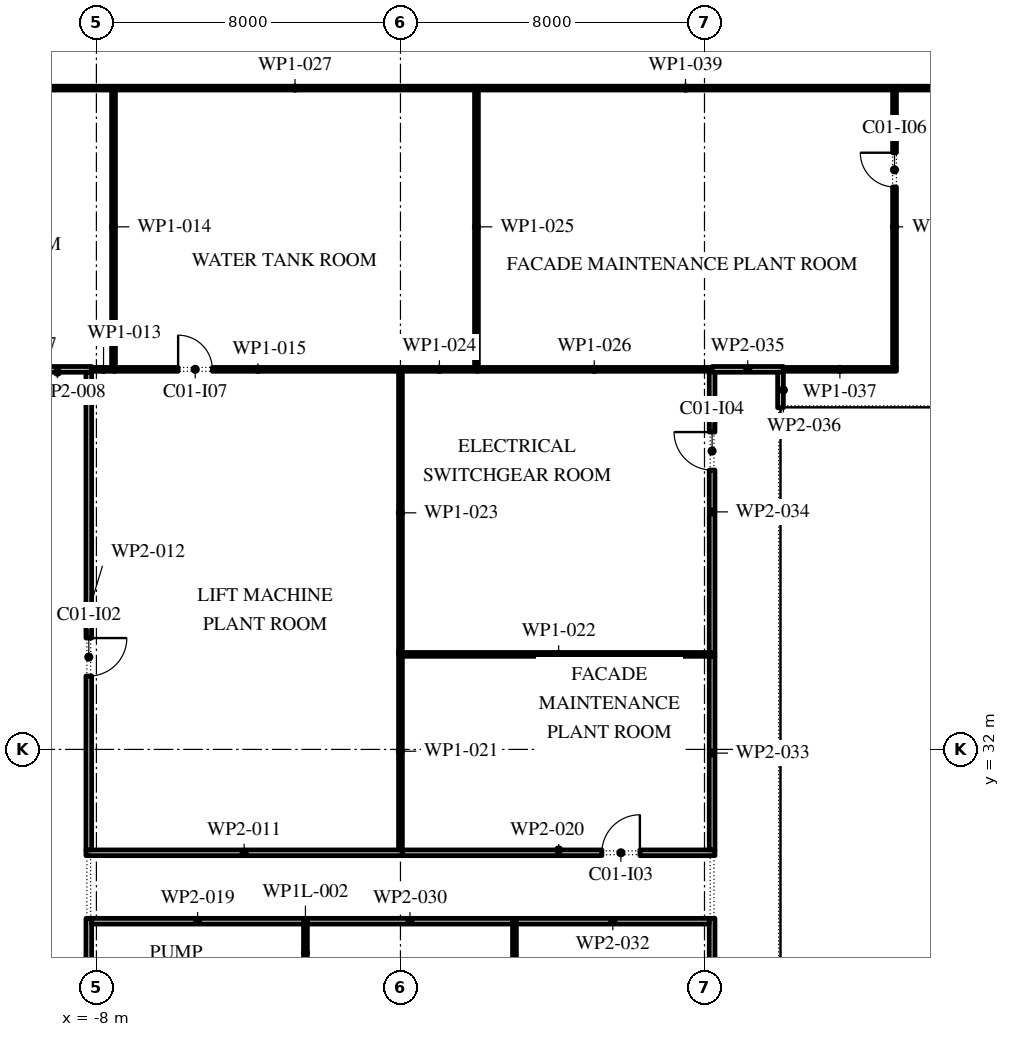
"""IFC4 building model, lengths in metres.
Left out: names, types, materials, properties, quantities, classifications, styles, units other than length and angle.
Written with IfcOpenShell. Run it as: python <this file> out.ifc"""

import sys

from ifc_helpers import new_model, si_unit, direction, frame, frame_2d, origin, place, context, subcontext, project, spatial, rectangle, extrude, element, fill, save


model = new_model("IFC4")
c1 = context("Model", 3, precision=1e-05, world=origin(), true_north=direction((0.0, 1.0)))
c2 = subcontext(c1, "Body", "Model", "MODEL_VIEW")
j1 = project(units=[si_unit("LENGTHUNIT", "METRE"), si_unit("PLANEANGLEUNIT", "RADIAN")], contexts=[c1])
p1 = place(None, origin())
s1 = spatial("IfcSite", under=j1, at=p1, CompositionType="ELEMENT")
p2 = place(p1, origin())
s2 = spatial("IfcBuilding", under=s1, at=p2, CompositionType="ELEMENT")
p3 = place(p2, frame((0.0, 0.0, 369.0)))
s3 = spatial("IfcBuildingStorey", under=s2, at=p3, CompositionType="ELEMENT", Elevation=369.0)
p4 = place(p3, frame((-9.925, 42.0, 0.0), z_axis=(0.0, 0.0, 1.0), x_axis=(1.0, 0.0, 0.0)))
e1 = element("IfcWall", 1, at=p4, inside=s3, PredefinedType="PARTITIONING", context=c2, shape_type="SweptSolid", body=[
    extrude(rectangle(XDim=1.8, YDim=0.15, at=frame_2d((0.9, 0.0))), origin(), (0.0, 0.0, 1.0), 4.0),
])
p5 = place(p3, frame((-8.2, 27.555, 0.0), z_axis=(0.0, 0.0, 1.0), x_axis=(0.0, -1.0, 0.0)))
e2 = element("IfcWall", 2, at=p5, inside=s3, PredefinedType="PARTITIONING", context=c2, shape_type="SweptSolid", body=[
    extrude(rectangle(XDim=8.48, YDim=0.15, at=frame_2d((4.24, 0.0))), origin(), (0.0, 0.0, 1.0), 4.0),
])
p6 = place(p5, frame((4.655, 0.0, 0.0)))
e3 = element("IfcOpeningElement", 3, at=p6, cuts=e2, PredefinedType="OPENING", context=c2, shape_type="SweptSolid", body=[
    extrude(rectangle(XDim=1.0, YDim=2.1, at=frame_2d((0.5, 1.05))), frame((0.0, 0.085, 0.0), z_axis=(0.0, -1.0, 0.0), x_axis=(1.0, 0.0, 0.0)), (0.0, 0.0, 1.0), 0.17),
])
p7 = place(p3, frame((-8.275, 29.28, 0.0), z_axis=(0.0, 0.0, 1.0), x_axis=(1.0, 0.0, 0.0)))
e4 = element("IfcWall", 4, at=p7, inside=s3, PredefinedType="PARTITIONING", context=c2, shape_type="SweptSolid", body=[
    extrude(rectangle(XDim=8.325, YDim=0.15, at=frame_2d((4.163, 0.0))), origin(), (0.0, 0.0, 1.0), 4.0),
])
p8 = place(p3, frame((-8.2, 41.925, 0.0), z_axis=(0.0, 0.0, 1.0), x_axis=(0.0, -1.0, 0.0)))
e5 = element("IfcWall", 5, at=p8, inside=s3, PredefinedType="PARTITIONING", context=c2, shape_type="SweptSolid", body=[
    extrude(rectangle(XDim=12.57, YDim=0.15, at=frame_2d((6.285, 0.0))), origin(), (0.0, 0.0, 1.0), 4.0),
])
p9 = place(p8, frame((6.995, 0.0, 0.0)))
e6 = element("IfcOpeningElement", 6, at=p9, cuts=e5, PredefinedType="OPENING", context=c2, shape_type="SweptSolid", body=[
    extrude(rectangle(XDim=1.0, YDim=2.1, at=frame_2d((0.5, 1.05))), frame((0.0, 0.085, 0.0), z_axis=(0.0, -1.0, 0.0), x_axis=(1.0, 0.0, 0.0)), (0.0, 0.0, 1.0), 0.17),
])
p10 = place(p3, frame((-8.125, 42.0, 0.0), z_axis=(0.0, 0.0, 1.0), x_axis=(1.0, 0.0, 0.0)))
e7 = element("IfcWall", 7, at=p10, inside=s3, PredefinedType="PARTITIONING", context=c2, shape_type="SweptSolid", body=[
    extrude(rectangle(XDim=0.625, YDim=0.1, at=frame_2d((0.312, 0.0))), origin(), (0.0, 0.0, 1.0), 4.0),
])
p11 = place(p3, frame((-7.55, 42.05, 0.0), z_axis=(0.0, 0.0, 1.0), x_axis=(0.0, 1.0, 0.0)))
e8 = element("IfcWall", 8, at=p11, inside=s3, PredefinedType="PARTITIONING", context=c2, shape_type="SweptSolid", body=[
    extrude(rectangle(XDim=7.4, YDim=0.1, at=frame_2d((3.7, 0.0))), origin(), (0.0, 0.0, 1.0), 4.0),
])
p12 = place(p3, frame((-7.55, 42.0, 0.0), z_axis=(0.0, 0.0, 1.0), x_axis=(1.0, 0.0, 0.0)))
e9 = element("IfcWall", 9, at=p12, inside=s3, PredefinedType="PARTITIONING", context=c2, shape_type="SweptSolid", body=[
    extrude(rectangle(XDim=7.6, YDim=0.1, at=frame_2d((3.8, 0.0))), origin(), (0.0, 0.0, 1.0), 4.0),
])
p13 = place(p12, frame((1.7, 0.0, 0.0)))
e10 = element("IfcOpeningElement", 10, at=p13, cuts=e9, PredefinedType="OPENING", context=c2, shape_type="SweptSolid", body=[
    extrude(rectangle(XDim=0.9, YDim=2.1, at=frame_2d((0.45, 1.05))), frame((0.0, 0.06, 0.0), z_axis=(0.0, -1.0, 0.0), x_axis=(1.0, 0.0, 0.0)), (0.0, 0.0, 1.0), 0.12),
])
p14 = place(p3, frame((-7.6, 49.4, 0.0), z_axis=(0.0, 0.0, 1.0), x_axis=(-1.0, 0.0, 0.0)))
e11 = element("IfcWall", 11, at=p14, inside=s3, PredefinedType="PARTITIONING", context=c2, shape_type="SweptSolid", body=[
    extrude(rectangle(XDim=10.35, YDim=0.1, at=frame_2d((5.175, 0.0))), origin(), (0.0, 0.0, 1.0), 4.0),
])
p15 = place(p3, frame((-2.55, 27.48, 0.0), z_axis=(0.0, 0.0, 1.0), x_axis=(-1.0, 0.0, 0.0)))
e12 = element("IfcWall", 12, at=p15, inside=s3, PredefinedType="PARTITIONING", context=c2, shape_type="SweptSolid", body=[
    extrude(rectangle(XDim=5.575, YDim=0.15, at=frame_2d((2.788, 0.0))), origin(), (0.0, 0.0, 1.0), 4.0),
])
p16 = place(p3, frame((0.05, 29.28, 0.0), z_axis=(0.0, 0.0, 1.0), x_axis=(1.0, 0.0, 0.0)))
e13 = element("IfcWall", 13, at=p16, inside=s3, PredefinedType="PARTITIONING", context=c2, shape_type="SweptSolid", body=[
    extrude(rectangle(XDim=8.225, YDim=0.15, at=frame_2d((4.112, 0.0))), origin(), (0.0, 0.0, 1.0), 4.0),
])
p17 = place(p16, frame((5.25, 0.0, 0.0)))
e14 = element("IfcOpeningElement", 14, at=p17, cuts=e13, PredefinedType="OPENING", context=c2, shape_type="SweptSolid", body=[
    extrude(rectangle(XDim=1.0, YDim=2.1, at=frame_2d((0.5, 1.05))), frame((0.0, 0.085, 0.0), z_axis=(0.0, -1.0, 0.0), x_axis=(1.0, 0.0, 0.0)), (0.0, 0.0, 1.0), 0.17),
])
p18 = place(p3, frame((0.0, 34.55, 0.0), z_axis=(0.0, 0.0, 1.0), x_axis=(0.0, -1.0, 0.0)))
e15 = element("IfcWall", 15, at=p18, inside=s3, PredefinedType="PARTITIONING", context=c2, shape_type="SweptSolid", body=[
    extrude(rectangle(XDim=5.195, YDim=0.1, at=frame_2d((2.598, 0.0))), origin(), (0.0, 0.0, 1.0), 4.0),
])
p19 = place(p3, frame((0.05, 34.5, 0.0), z_axis=(0.0, 0.0, 1.0), x_axis=(1.0, 0.0, 0.0)))
e16 = element("IfcWall", 16, at=p19, inside=s3, PredefinedType="PARTITIONING", context=c2, shape_type="SweptSolid", body=[
    extrude(rectangle(XDim=8.225, YDim=0.1, at=frame_2d((4.112, 0.0))), origin(), (0.0, 0.0, 1.0), 4.0),
])
p20 = place(p3, frame((0.0, 41.95, 0.0), z_axis=(0.0, 0.0, 1.0), x_axis=(0.0, -1.0, 0.0)))
e17 = element("IfcWall", 17, at=p20, inside=s3, PredefinedType="PARTITIONING", context=c2, shape_type="SweptSolid", body=[
    extrude(rectangle(XDim=7.45, YDim=0.1, at=frame_2d((3.725, 0.0))), origin(), (0.0, 0.0, 1.0), 4.0),
])
p21 = place(p3, frame((0.0, 42.0, 0.0), z_axis=(0.0, 0.0, 1.0), x_axis=(1.0, 0.0, 0.0)))
e18 = element("IfcWall", 18, at=p21, inside=s3, PredefinedType="PARTITIONING", context=c2, shape_type="SweptSolid", body=[
    extrude(rectangle(XDim=2.05, YDim=0.1, at=frame_2d((1.025, 0.0))), origin(), (0.0, 0.0, 1.0), 4.0),
])
p22 = place(p3, frame((2.0, 42.05, 0.0), z_axis=(0.0, 0.0, 1.0), x_axis=(0.0, 1.0, 0.0)))
e19 = element("IfcWall", 19, at=p22, inside=s3, PredefinedType="PARTITIONING", context=c2, shape_type="SweptSolid", body=[
    extrude(rectangle(XDim=7.4, YDim=0.1, at=frame_2d((3.7, 0.0))), origin(), (0.0, 0.0, 1.0), 4.0),
])
p23 = place(p3, frame((2.0, 42.0, 0.0), z_axis=(0.0, 0.0, 1.0), x_axis=(1.0, 0.0, 0.0)))
e20 = element("IfcWall", 20, at=p23, inside=s3, PredefinedType="PARTITIONING", context=c2, shape_type="SweptSolid", body=[
    extrude(rectangle(XDim=6.2, YDim=0.1, at=frame_2d((3.1, 0.0))), origin(), (0.0, 0.0, 1.0), 4.0),
])
p24 = place(p3, frame((1.95, 49.4, 0.0), z_axis=(0.0, 0.0, 1.0), x_axis=(-1.0, 0.0, 0.0)))
e21 = element("IfcWall", 21, at=p24, inside=s3, PredefinedType="PARTITIONING", context=c2, shape_type="SweptSolid", body=[
    extrude(rectangle(XDim=9.45, YDim=0.1, at=frame_2d((4.725, 0.0))), origin(), (0.0, 0.0, 1.0), 4.0),
])
p25 = place(p3, frame((3.0, 19.075, 0.0), z_axis=(0.0, 0.0, 1.0), x_axis=(0.0, 1.0, 0.0)))
e22 = element("IfcWall", 22, at=p25, inside=s3, PredefinedType="PARTITIONING", context=c2, shape_type="SweptSolid", body=[
    extrude(rectangle(XDim=8.48, YDim=0.1, at=frame_2d((4.24, 0.0))), origin(), (0.0, 0.0, 1.0), 4.0),
])
p26 = place(p3, frame((2.95, 27.48, 0.0), z_axis=(0.0, 0.0, 1.0), x_axis=(-1.0, 0.0, 0.0)))
e23 = element("IfcWall", 23, at=p26, inside=s3, PredefinedType="PARTITIONING", context=c2, shape_type="SweptSolid", body=[
    extrude(rectangle(XDim=5.4, YDim=0.15, at=frame_2d((2.7, 0.0))), origin(), (0.0, 0.0, 1.0), 4.0),
])
p27 = place(p3, frame((8.2, 19.075, 0.0), z_axis=(0.0, 0.0, 1.0), x_axis=(0.0, 1.0, 0.0)))
e24 = element("IfcWall", 24, at=p27, inside=s3, PredefinedType="PARTITIONING", context=c2, shape_type="SweptSolid", body=[
    extrude(rectangle(XDim=8.48, YDim=0.15, at=frame_2d((4.24, 0.0))), origin(), (0.0, 0.0, 1.0), 4.0),
])
p28 = place(p27, frame((2.755, 0.0, 0.0)))
e25 = element("IfcOpeningElement", 25, at=p28, cuts=e24, PredefinedType="OPENING", context=c2, shape_type="SweptSolid", body=[
    extrude(rectangle(XDim=1.0, YDim=2.1, at=frame_2d((0.5, 1.05))), frame((0.0, 0.085, 0.0), z_axis=(0.0, -1.0, 0.0), x_axis=(1.0, 0.0, 0.0)), (0.0, 0.0, 1.0), 0.17),
])
p29 = place(p3, frame((8.125, 27.48, 0.0), z_axis=(0.0, 0.0, 1.0), x_axis=(-1.0, 0.0, 0.0)))
e26 = element("IfcWall", 26, at=p29, inside=s3, PredefinedType="PARTITIONING", context=c2, shape_type="SweptSolid", body=[
    extrude(rectangle(XDim=5.075, YDim=0.15, at=frame_2d((2.538, 0.0))), origin(), (0.0, 0.0, 1.0), 4.0),
])
p30 = place(p3, frame((8.2, 29.355, 0.0), z_axis=(0.0, 0.0, 1.0), x_axis=(0.0, 1.0, 0.0)))
e27 = element("IfcWall", 27, at=p30, inside=s3, PredefinedType="PARTITIONING", context=c2, shape_type="SweptSolid", body=[
    extrude(rectangle(XDim=5.095, YDim=0.15, at=frame_2d((2.547, 0.0))), origin(), (0.0, 0.0, 1.0), 4.0),
])
p31 = place(p3, frame((8.2, 34.55, 0.0), z_axis=(0.0, 0.0, 1.0), x_axis=(0.0, 1.0, 0.0)))
e28 = element("IfcWall", 28, at=p31, inside=s3, PredefinedType="PARTITIONING", context=c2, shape_type="SweptSolid", body=[
    extrude(rectangle(XDim=7.4, YDim=0.15, at=frame_2d((3.7, 0.0))), origin(), (0.0, 0.0, 1.0), 4.0),
])
p32 = place(p31, frame((4.8, 0.0, 0.0)))
e29 = element("IfcOpeningElement", 29, at=p32, cuts=e28, PredefinedType="OPENING", context=c2, shape_type="SweptSolid", body=[
    extrude(rectangle(XDim=1.0, YDim=2.1, at=frame_2d((0.5, 1.05))), frame((0.0, 0.085, 0.0), z_axis=(0.0, -1.0, 0.0), x_axis=(1.0, 0.0, 0.0)), (0.0, 0.0, 1.0), 0.17),
])
p33 = place(p3, frame((8.2, 42.0, 0.0), z_axis=(0.0, 0.0, 1.0), x_axis=(1.0, 0.0, 0.0)))
e30 = element("IfcWall", 30, at=p33, inside=s3, PredefinedType="PARTITIONING", context=c2, shape_type="SweptSolid", body=[
    extrude(rectangle(XDim=1.875, YDim=0.15, at=frame_2d((0.938, 0.0))), origin(), (0.0, 0.0, 1.0), 4.0),
])
p34 = place(p3, frame((10.0, 41.925, 0.0), z_axis=(0.0, 0.0, 1.0), x_axis=(0.0, -1.0, 0.0)))
e31 = element("IfcWall", 31, at=p34, inside=s3, PredefinedType="PARTITIONING", context=c2, shape_type="SweptSolid", body=[
    extrude(rectangle(XDim=0.935, YDim=0.15, at=frame_2d((0.468, 0.0))), origin(), (0.0, 0.0, 1.0), 4.0),
])
p35 = place(p3, frame((10.075, 42.0, 0.0), z_axis=(0.0, 0.0, 1.0), x_axis=(1.0, 0.0, 0.0)))
e32 = element("IfcWall", 32, at=p35, inside=s3, PredefinedType="PARTITIONING", context=c2, shape_type="SweptSolid", body=[
    extrude(rectangle(XDim=2.975, YDim=0.1, at=frame_2d((1.488, 0.0))), origin(), (0.0, 0.0, 1.0), 4.0),
])
p36 = place(p3, frame((13.0, 42.05, 0.0), z_axis=(0.0, 0.0, 1.0), x_axis=(0.0, 1.0, 0.0)))
e33 = element("IfcWall", 33, at=p36, inside=s3, PredefinedType="PARTITIONING", context=c2, shape_type="SweptSolid", body=[
    extrude(rectangle(XDim=7.4, YDim=0.1, at=frame_2d((3.7, 0.0))), origin(), (0.0, 0.0, 1.0), 3.02),
])
p37 = place(p36, frame((4.75, 0.0, 0.0)))
e34 = element("IfcOpeningElement", 34, at=p37, cuts=e33, PredefinedType="OPENING", context=c2, shape_type="SweptSolid", body=[
    extrude(rectangle(XDim=0.9, YDim=2.1, at=frame_2d((0.45, 1.05))), frame((0.0, 0.06, 0.0), z_axis=(0.0, -1.0, 0.0), x_axis=(1.0, 0.0, 0.0)), (0.0, 0.0, 1.0), 0.12),
])
p38 = place(p3, frame((12.95, 49.4, 0.0), z_axis=(0.0, 0.0, 1.0), x_axis=(-1.0, 0.0, 0.0)))
e35 = element("IfcWall", 35, at=p38, inside=s3, PredefinedType="PARTITIONING", context=c2, shape_type="SweptSolid", body=[
    extrude(rectangle(XDim=10.9, YDim=0.1, at=frame_2d((5.45, 0.0))), origin(), (0.0, 0.0, 1.0), 4.0),
])
p39 = place(p3, frame((22.66, 49.4, 0.0), z_axis=(0.0, 0.0, 1.0), x_axis=(-1.0, 0.0, 0.0)))
e36 = element("IfcWall", 36, at=p39, inside=s3, PredefinedType="PARTITIONING", context=c2, shape_type="SweptSolid", body=[
    extrude(rectangle(XDim=9.61, YDim=0.1, at=frame_2d((4.805, 0.0))), origin(), (0.0, 0.0, 1.0), 4.0),
])
p40 = place(p39, frame((3.45, 0.0, 0.0)))
e37 = element("IfcOpeningElement", 37, at=p40, cuts=e36, PredefinedType="OPENING", context=c2, shape_type="SweptSolid", body=[
    extrude(rectangle(XDim=0.9, YDim=2.1, at=frame_2d((0.45, 1.05))), frame((0.0, 0.06, 0.0), z_axis=(0.0, -1.0, 0.0), x_axis=(1.0, 0.0, 0.0)), (0.0, 0.0, 1.0), 0.12),
])
p41 = place(p3, frame((-2.5, 25.745, 0.0), z_axis=(0.0, 0.0, 1.0), x_axis=(0.0, 1.0, 0.0)))
e38 = element("IfcWall", 38, at=p41, inside=s3, PredefinedType="PARTITIONING", context=c2, shape_type="SweptSolid", body=[
    extrude(rectangle(XDim=1.81, YDim=0.1, at=frame_2d((0.905, 0.0))), origin(), (0.0, 0.0, 1.0), 3.02),
])
p42 = place(p9, origin())
e39 = element("IfcDoor", 39, at=p42, inside=s3, OperationType="SINGLE_SWING_RIGHT", PredefinedType="DOOR", context=c2, shape_type="SweptSolid", body=[
    extrude(rectangle(XDim=1.0, YDim=2.1, at=frame_2d((0.5, 1.05))), frame((0.0, 0.025, 0.0), z_axis=(0.0, -1.0, 0.0), x_axis=(1.0, 0.0, 0.0)), (0.0, 0.0, 1.0), 0.05),
])
fill(e6, e39)
p43 = place(p17, origin())
e40 = element("IfcDoor", 40, at=p43, inside=s3, OperationType="SINGLE_SWING_LEFT", PredefinedType="DOOR", context=c2, shape_type="SweptSolid", body=[
    extrude(rectangle(XDim=1.0, YDim=2.1, at=frame_2d((0.5, 1.05))), frame((0.0, 0.025, 0.0), z_axis=(0.0, -1.0, 0.0), x_axis=(1.0, 0.0, 0.0)), (0.0, 0.0, 1.0), 0.05),
])
fill(e14, e40)
p44 = place(p32, origin())
e41 = element("IfcDoor", 41, at=p44, inside=s3, OperationType="SINGLE_SWING_LEFT", PredefinedType="DOOR", context=c2, shape_type="SweptSolid", body=[
    extrude(rectangle(XDim=1.0, YDim=2.1, at=frame_2d((0.5, 1.05))), frame((0.0, 0.025, 0.0), z_axis=(0.0, -1.0, 0.0), x_axis=(1.0, 0.0, 0.0)), (0.0, 0.0, 1.0), 0.05),
])
fill(e29, e41)
p45 = place(p37, origin())
e42 = element("IfcDoor", 42, at=p45, inside=s3, OperationType="SINGLE_SWING_LEFT", PredefinedType="DOOR", context=c2, shape_type="SweptSolid", body=[
    extrude(rectangle(XDim=0.9, YDim=2.1, at=frame_2d((0.45, 1.05))), frame((0.0, 0.025, 0.0), z_axis=(0.0, -1.0, 0.0), x_axis=(1.0, 0.0, 0.0)), (0.0, 0.0, 1.0), 0.05),
])
fill(e34, e42)
p46 = place(p13, origin())
e43 = element("IfcDoor", 43, at=p46, inside=s3, OperationType="SINGLE_SWING_RIGHT", PredefinedType="DOOR", context=c2, shape_type="SweptSolid", body=[
    extrude(rectangle(XDim=0.9, YDim=2.1, at=frame_2d((0.45, 1.05))), frame((0.0, 0.025, 0.0), z_axis=(0.0, -1.0, 0.0), x_axis=(1.0, 0.0, 0.0)), (0.0, 0.0, 1.0), 0.05),
])
fill(e10, e43)
save(model, sys.argv[1])
